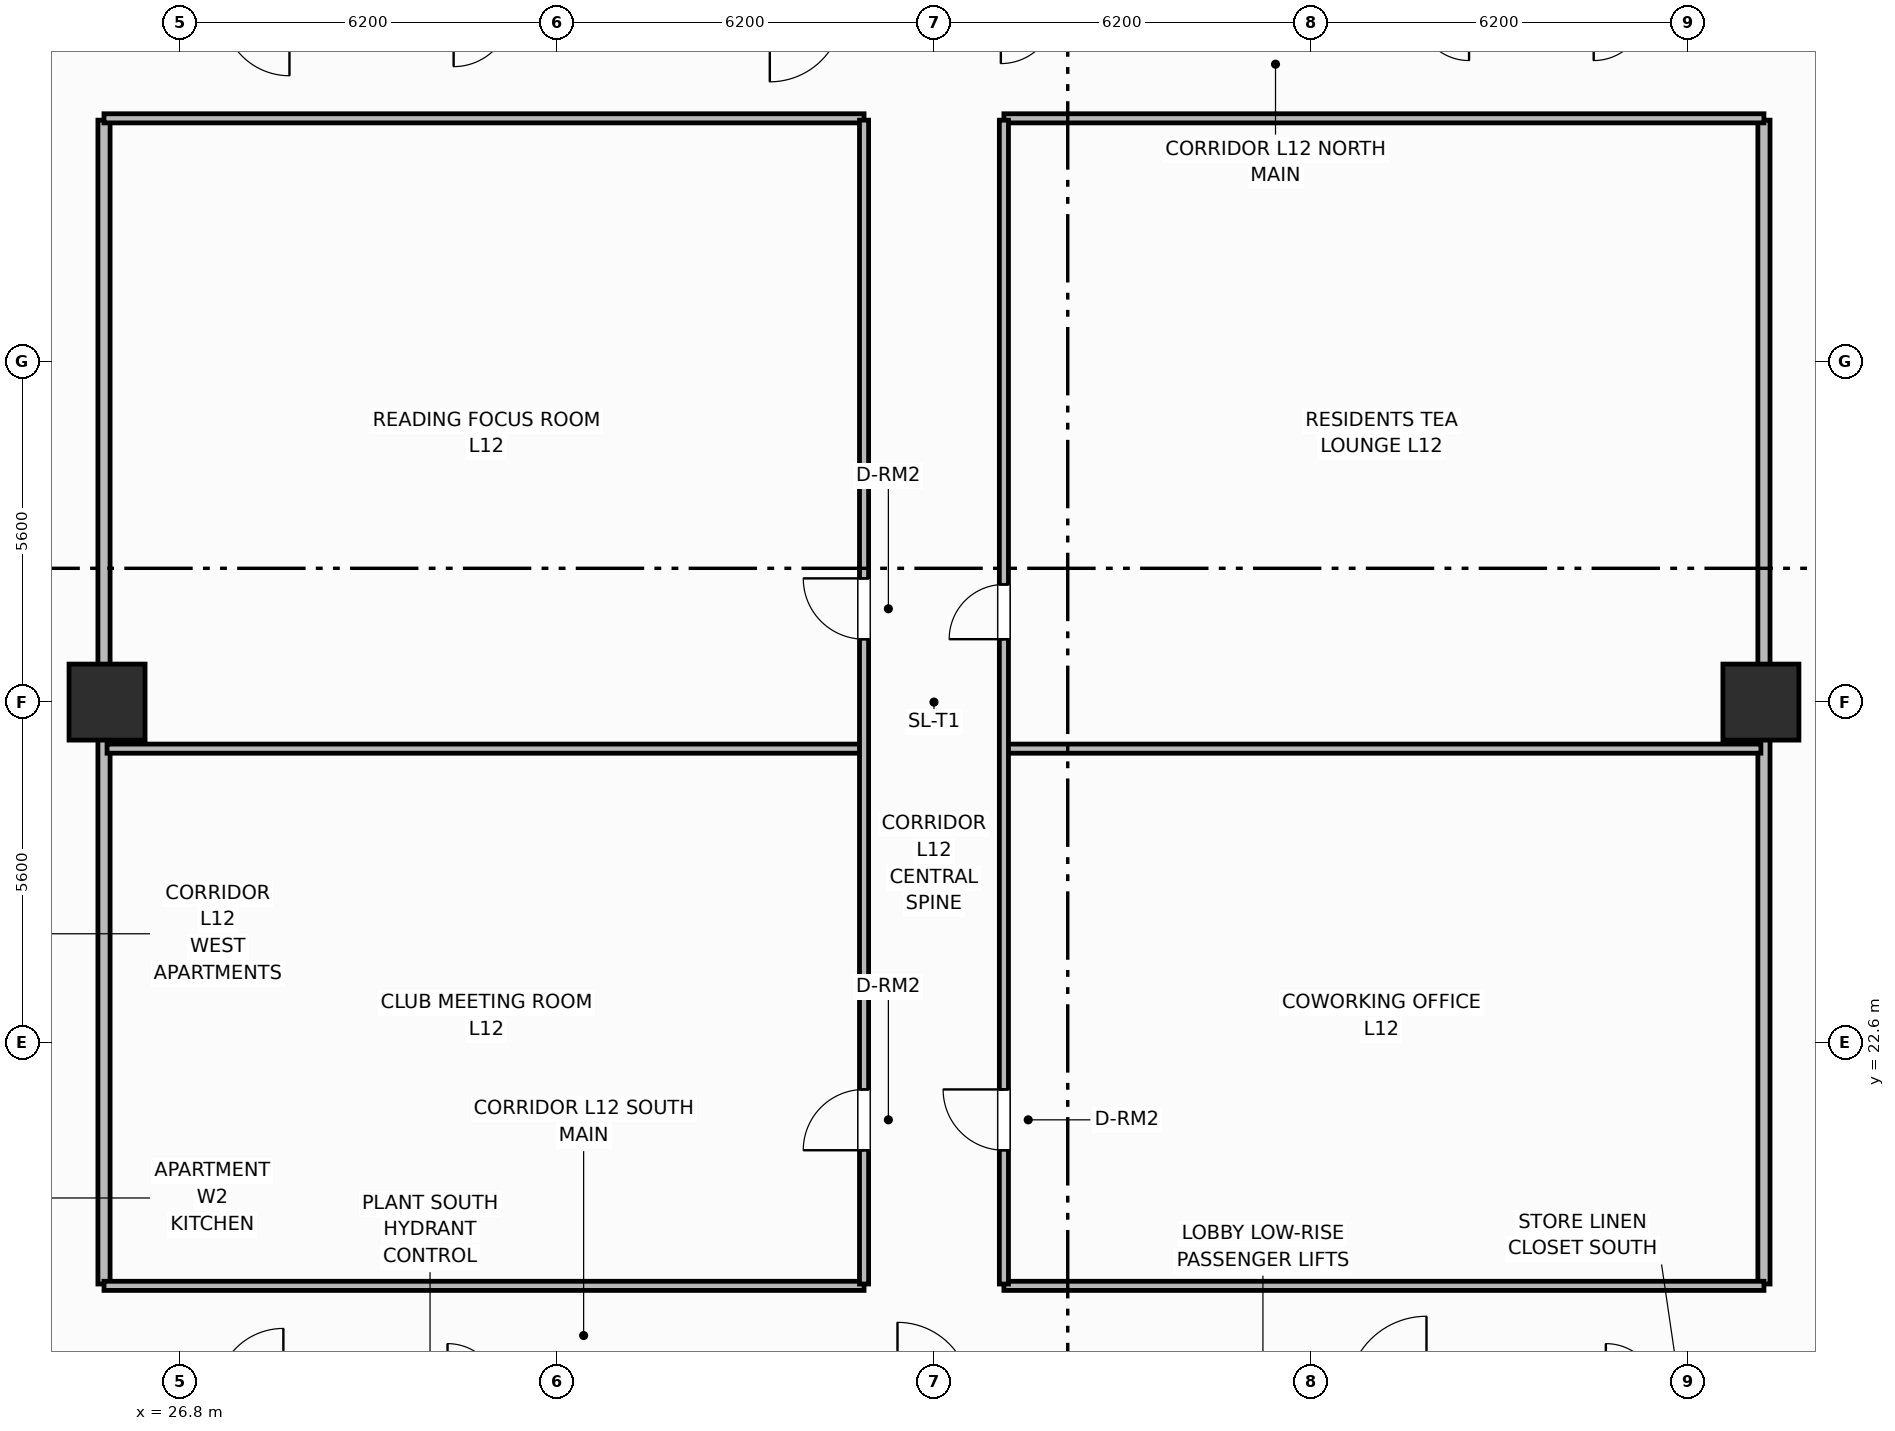
"""IFC4 building model, lengths in metres.
Left out: names, types, materials, properties, quantities, classifications, styles, units other than length and angle.
Written with IfcOpenShell. Run it as: python <this file> out.ifc"""

import sys

from ifc_helpers import new_model, si_unit, direction, frame, frame_2d, origin, origin_2d, place, context, subcontext, project, spatial, rectangle, extrude, element, fill, save


model = new_model("IFC4")
c1 = context("Model", 3, precision=1e-05, world=origin(), true_north=direction((0.0, 1.0)))
c2 = subcontext(c1, "Body", "Model", "MODEL_VIEW")
j1 = project(units=[si_unit("LENGTHUNIT", "METRE"), si_unit("PLANEANGLEUNIT", "RADIAN")], contexts=[c1])
p1 = place(None, origin())
s1 = spatial("IfcSite", under=j1, at=p1, CompositionType="ELEMENT")
p2 = place(p1, origin())
s2 = spatial("IfcBuilding", under=s1, at=p2, CompositionType="ELEMENT")
p3 = place(p2, frame((0.0, 0.0, 51.0)))
s3 = spatial("IfcBuildingStorey", under=s2, at=p3, CompositionType="ELEMENT", Elevation=51.0)
for number, where, z_axis, x_axis in (
    (1, (25.6, 28.2, 0.0), (0.0, 0.0, 1.0), (1.0, 0.0, 0.0)),
    (2, (52.8, 28.2, 0.0), (0.0, 0.0, 1.0), (1.0, 0.0, 0.0)),
):
    element("IfcColumn", number, at=place(p3, frame(where, z_axis=z_axis, x_axis=x_axis)), inside=s3, PredefinedType="COLUMN", context=c2, shape_type="SweptSolid", body=[
        extrude(rectangle(XDim=1.25, YDim=1.25, at=origin_2d()), origin(), (0.0, 0.0, 1.0), 3.7),
    ])
for number, where, z_axis, x_axis in (
    (3, (25.55, 18.63, 0.0), (0.0, 0.0, 1.0), (0.0, 1.0, 0.0)),
    (4, (52.85, 18.63, 0.0), (0.0, 0.0, 1.0), (0.0, 1.0, 0.0)),
):
    element("IfcWall", number, at=place(p3, frame(where, z_axis=z_axis, x_axis=x_axis)), inside=s3, PredefinedType="PARTITIONING", context=c2, shape_type="SweptSolid", body=[
        extrude(rectangle(XDim=19.14, YDim=0.2, at=frame_2d((9.57, 0.0))), origin(), (0.0, 0.0, 1.0), 2.53),
    ])
for number, where, z_axis, x_axis in (
    (5, (25.55, 18.6, 0.0), (0.0, 0.0, 1.0), (1.0, 0.0, 0.0)),
    (6, (40.35, 18.6, 0.0), (0.0, 0.0, 1.0), (1.0, 0.0, 0.0)),
    (7, (25.55, 37.8, 0.0), (0.0, 0.0, 1.0), (1.0, 0.0, 0.0)),
    (8, (40.35, 37.8, 0.0), (0.0, 0.0, 1.0), (1.0, 0.0, 0.0)),
):
    element("IfcWall", number, at=place(p3, frame(where, z_axis=z_axis, x_axis=x_axis)), inside=s3, PredefinedType="PARTITIONING", context=c2, shape_type="SweptSolid", body=[
        extrude(rectangle(XDim=12.5, YDim=0.15, at=frame_2d((6.25, 0.0))), origin(), (0.0, 0.0, 1.0), 2.53),
    ])
p4 = place(p3, frame((25.6, 27.434, 0.0), z_axis=(0.0, 0.0, 1.0), x_axis=(1.0, 0.0, 0.0)))
e9 = element("IfcWall", 9, at=p4, inside=s3, PredefinedType="PARTITIONING", context=c2, shape_type="SweptSolid", body=[
    extrude(rectangle(XDim=12.47, YDim=0.15, at=frame_2d((6.235, 0.0))), origin(), (0.0, 0.0, 1.0), 2.53),
])
p5 = place(p3, frame((40.38, 27.434, 0.0), z_axis=(0.0, 0.0, 1.0), x_axis=(1.0, 0.0, 0.0)))
e10 = element("IfcWall", 10, at=p5, inside=s3, PredefinedType="PARTITIONING", context=c2, shape_type="SweptSolid", body=[
    extrude(rectangle(XDim=12.42, YDim=0.15, at=frame_2d((6.21, 0.0))), origin(), (0.0, 0.0, 1.0), 2.53),
])
p6 = place(p3, frame((38.05, 18.63, 0.0), z_axis=(0.0, 0.0, 1.0), x_axis=(0.0, 1.0, 0.0)))
e11 = element("IfcWall", 11, at=p6, inside=s3, PredefinedType="PARTITIONING", context=c2, shape_type="SweptSolid", body=[
    extrude(rectangle(XDim=19.14, YDim=0.15, at=frame_2d((9.57, 0.0))), origin(), (0.0, 0.0, 1.0), 2.53),
])
p7 = place(p6, frame((2.2, 0.0, 0.0)))
e12 = element("IfcOpeningElement", 12, at=p7, cuts=e11, PredefinedType="OPENING", context=c2, shape_type="SweptSolid", body=[
    extrude(rectangle(XDim=1.0, YDim=2.15, at=frame_2d((0.5, 1.075))), frame((0.0, 0.085, 0.0), z_axis=(0.0, -1.0, 0.0), x_axis=(1.0, 0.0, 0.0)), (0.0, 0.0, 1.0), 0.17),
])
p8 = place(p6, frame((10.604, 0.0, 0.0)))
e13 = element("IfcOpeningElement", 13, at=p8, cuts=e11, PredefinedType="OPENING", context=c2, shape_type="SweptSolid", body=[
    extrude(rectangle(XDim=1.0, YDim=2.15, at=frame_2d((0.5, 1.075))), frame((0.0, 0.085, 0.0), z_axis=(0.0, -1.0, 0.0), x_axis=(1.0, 0.0, 0.0)), (0.0, 0.0, 1.0), 0.17),
])
p9 = place(p3, frame((40.35, 18.63, 0.0), z_axis=(0.0, 0.0, 1.0), x_axis=(0.0, 1.0, 0.0)))
e14 = element("IfcWall", 14, at=p9, inside=s3, PredefinedType="PARTITIONING", context=c2, shape_type="SweptSolid", body=[
    extrude(rectangle(XDim=19.14, YDim=0.15, at=frame_2d((9.57, 0.0))), origin(), (0.0, 0.0, 1.0), 2.53),
])
p10 = place(p9, frame((2.2, 0.0, 0.0)))
e15 = element("IfcOpeningElement", 15, at=p10, cuts=e14, PredefinedType="OPENING", context=c2, shape_type="SweptSolid", body=[
    extrude(rectangle(XDim=1.0, YDim=2.15, at=frame_2d((0.5, 1.075))), frame((0.0, 0.085, 0.0), z_axis=(0.0, -1.0, 0.0), x_axis=(1.0, 0.0, 0.0)), (0.0, 0.0, 1.0), 0.17),
])
p11 = place(p9, frame((10.604, 0.0, 0.0)))
e16 = element("IfcOpeningElement", 16, at=p11, cuts=e14, PredefinedType="OPENING", context=c2, shape_type="SweptSolid", body=[
    extrude(rectangle(XDim=0.9, YDim=2.1, at=frame_2d((0.45, 1.05))), frame((0.0, 0.085, 0.0), z_axis=(0.0, -1.0, 0.0), x_axis=(1.0, 0.0, 0.0)), (0.0, 0.0, 1.0), 0.17),
])
p12 = place(p7, origin())
e17 = element("IfcDoor", 17, at=p12, inside=s3, OperationType="SINGLE_SWING_LEFT", PredefinedType="DOOR", context=c2, shape_type="SweptSolid", body=[
    extrude(rectangle(XDim=1.0, YDim=2.15, at=frame_2d((0.5, 1.075))), frame((0.0, 0.025, 0.0), z_axis=(0.0, -1.0, 0.0), x_axis=(1.0, 0.0, 0.0)), (0.0, 0.0, 1.0), 0.05),
])
fill(e12, e17)
p13 = place(p8, origin())
e18 = element("IfcDoor", 18, at=p13, inside=s3, OperationType="SINGLE_SWING_RIGHT", PredefinedType="DOOR", context=c2, shape_type="SweptSolid", body=[
    extrude(rectangle(XDim=1.0, YDim=2.15, at=frame_2d((0.5, 1.075))), frame((0.0, 0.025, 0.0), z_axis=(0.0, -1.0, 0.0), x_axis=(1.0, 0.0, 0.0)), (0.0, 0.0, 1.0), 0.05),
])
fill(e13, e18)
p14 = place(p10, origin())
e19 = element("IfcDoor", 19, at=p14, inside=s3, OperationType="SINGLE_SWING_RIGHT", PredefinedType="DOOR", context=c2, shape_type="SweptSolid", body=[
    extrude(rectangle(XDim=1.0, YDim=2.15, at=frame_2d((0.5, 1.075))), frame((0.0, 0.025, 0.0), z_axis=(0.0, -1.0, 0.0), x_axis=(1.0, 0.0, 0.0)), (0.0, 0.0, 1.0), 0.05),
])
fill(e15, e19)
p15 = place(p11, origin())
e20 = element("IfcDoor", 20, at=p15, inside=s3, OperationType="SINGLE_SWING_LEFT", PredefinedType="DOOR", context=c2, shape_type="SweptSolid", body=[
    extrude(rectangle(XDim=0.9, YDim=2.1, at=frame_2d((0.45, 1.05))), frame((0.0, 0.025, 0.0), z_axis=(0.0, -1.0, 0.0), x_axis=(1.0, 0.0, 0.0)), (0.0, 0.0, 1.0), 0.05),
])
fill(e16, e20)
save(model, sys.argv[1])
